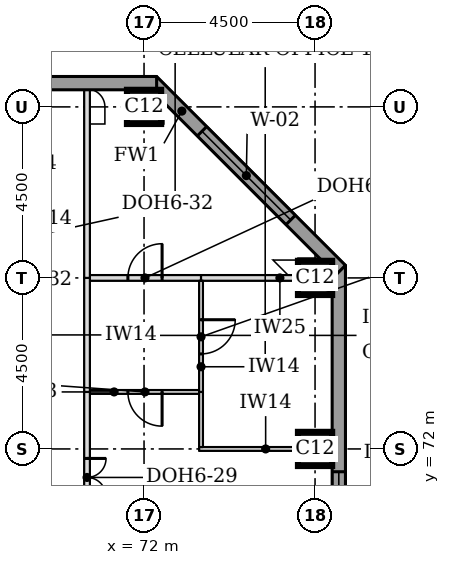
"""IFC4 building model, lengths in metres.
Left out: names, types, materials, properties, quantities, classifications, styles, units other than length and angle.
Written with IfcOpenShell. Run it as: python <this file> out.ifc"""

import sys

from ifc_helpers import new_model, si_unit, direction, frame, frame_2d, origin, origin_2d, place, context, subcontext, project, spatial, rectangle, extrude, element, fill, save


model = new_model("IFC4")
c1 = context("Model", 3, precision=1e-05, world=origin(), true_north=direction((0.0, 1.0)))
c2 = subcontext(c1, "Body", "Model", "MODEL_VIEW")
j1 = project(units=[si_unit("LENGTHUNIT", "METRE"), si_unit("PLANEANGLEUNIT", "RADIAN")], contexts=[c1])
p1 = place(None, origin())
s1 = spatial("IfcSite", under=j1, at=p1, CompositionType="ELEMENT")
p2 = place(p1, origin())
s2 = spatial("IfcBuilding", under=s1, at=p2, CompositionType="ELEMENT")
p3 = place(p2, frame((0.0, 0.0, 188.4)))
s3 = spatial("IfcBuildingStorey", under=s2, at=p3, CompositionType="ELEMENT", Elevation=188.4)
for number, where, z_axis, x_axis in (
    (1, (76.5, 72.0, 0.0), (0.0, 0.0, 1.0), (1.0, 0.0, 0.0)),
    (2, (76.5, 76.5, 0.0), (0.0, 0.0, 1.0), (1.0, 0.0, 0.0)),
    (3, (72.0, 81.0, 0.0), (0.0, 0.0, 1.0), (1.0, 0.0, 0.0)),
):
    element("IfcColumn", number, at=place(p3, frame(where, z_axis=z_axis, x_axis=x_axis)), inside=s3, PredefinedType="COLUMN", context=c2, shape_type="SweptSolid", body=[
        extrude(rectangle(XDim=0.9, YDim=0.9, at=origin_2d()), origin(), (0.0, 0.0, 1.0), 3.7),
    ])
p4 = place(p3, frame((77.125, 44.669, 0.0), z_axis=(0.0, 0.0, 1.0), x_axis=(0.0, 1.0, 0.0)))
e4 = element("IfcWall", 4, at=p4, inside=s3, PredefinedType="STANDARD", context=c2, shape_type="SweptSolid", body=[
    extrude(rectangle(XDim=32.163, YDim=0.35, at=frame_2d((16.081, 0.0))), origin(), (0.0, 0.0, 1.0), 3.525),
])
p5 = place(p4, frame((5.431, 0.0, 0.9)))
e5 = element("IfcOpeningElement", 5, at=p5, cuts=e4, PredefinedType="OPENING", context=c2, shape_type="SweptSolid", body=[
    extrude(rectangle(XDim=3.3, YDim=1.9, at=frame_2d((1.65, 0.95))), frame((0.0, 0.185, 0.0), z_axis=(0.0, -1.0, 0.0), x_axis=(1.0, 0.0, 0.0)), (0.0, 0.0, 1.0), 0.37),
])
p6 = place(p4, frame((9.931, 0.0, 0.9)))
e6 = element("IfcOpeningElement", 6, at=p6, cuts=e4, PredefinedType="OPENING", context=c2, shape_type="SweptSolid", body=[
    extrude(rectangle(XDim=3.3, YDim=1.9, at=frame_2d((1.65, 0.95))), frame((0.0, 0.185, 0.0), z_axis=(0.0, -1.0, 0.0), x_axis=(1.0, 0.0, 0.0)), (0.0, 0.0, 1.0), 0.37),
])
p7 = place(p4, frame((14.431, 0.0, 0.9)))
e7 = element("IfcOpeningElement", 7, at=p7, cuts=e4, PredefinedType="OPENING", context=c2, shape_type="SweptSolid", body=[
    extrude(rectangle(XDim=3.3, YDim=1.9, at=frame_2d((1.65, 0.95))), frame((0.0, 0.185, 0.0), z_axis=(0.0, -1.0, 0.0), x_axis=(1.0, 0.0, 0.0)), (0.0, 0.0, 1.0), 0.37),
])
p8 = place(p4, frame((18.931, 0.0, 0.9)))
e8 = element("IfcOpeningElement", 8, at=p8, cuts=e4, PredefinedType="OPENING", context=c2, shape_type="SweptSolid", body=[
    extrude(rectangle(XDim=3.3, YDim=1.9, at=frame_2d((1.65, 0.95))), frame((0.0, 0.185, 0.0), z_axis=(0.0, -1.0, 0.0), x_axis=(1.0, 0.0, 0.0)), (0.0, 0.0, 1.0), 0.37),
])
p9 = place(p4, frame((23.431, 0.0, 0.9)))
e9 = element("IfcOpeningElement", 9, at=p9, cuts=e4, PredefinedType="OPENING", context=c2, shape_type="SweptSolid", body=[
    extrude(rectangle(XDim=3.3, YDim=1.9, at=frame_2d((1.65, 0.95))), frame((0.0, 0.185, 0.0), z_axis=(0.0, -1.0, 0.0), x_axis=(1.0, 0.0, 0.0)), (0.0, 0.0, 1.0), 0.37),
])
p10 = place(p3, frame((77.176, 76.708, 0.0), z_axis=(0.0, 0.0, 1.0), x_axis=(-0.707106781187, 0.707106781187, 0.0)))
e10 = element("IfcWall", 10, at=p10, inside=s3, PredefinedType="STANDARD", context=c2, shape_type="SweptSolid", body=[
    extrude(rectangle(XDim=7.027, YDim=0.35, at=frame_2d((3.513, 0.0))), origin(), (0.0, 0.0, 1.0), 3.525),
])
p11 = place(p10, frame((1.863, 0.0, 0.9)))
e11 = element("IfcOpeningElement", 11, at=p11, cuts=e10, PredefinedType="OPENING", context=c2, shape_type="SweptSolid", body=[
    extrude(rectangle(XDim=3.3, YDim=1.9, at=frame_2d((1.65, 0.95))), frame((0.0, 0.185, 0.0), z_axis=(0.0, -1.0, 0.0), x_axis=(1.0, 0.0, 0.0)), (0.0, 0.0, 1.0), 0.37),
])
p12 = place(p3, frame((72.331, 81.625, 0.0), z_axis=(0.0, 0.0, 1.0), x_axis=(-1.0, 0.0, 0.0)))
e12 = element("IfcWall", 12, at=p12, inside=s3, PredefinedType="STANDARD", context=c2, shape_type="SweptSolid", body=[
    extrude(rectangle(XDim=32.163, YDim=0.35, at=frame_2d((16.081, 0.0))), origin(), (0.0, 0.0, 1.0), 3.525),
])
p13 = place(p12, frame((5.431, 0.0, 0.9)))
e13 = element("IfcOpeningElement", 13, at=p13, cuts=e12, PredefinedType="OPENING", context=c2, shape_type="SweptSolid", body=[
    extrude(rectangle(XDim=3.3, YDim=1.9, at=frame_2d((1.65, 0.95))), frame((0.0, 0.185, 0.0), z_axis=(0.0, -1.0, 0.0), x_axis=(1.0, 0.0, 0.0)), (0.0, 0.0, 1.0), 0.37),
])
p14 = place(p12, frame((9.931, 0.0, 0.9)))
e14 = element("IfcOpeningElement", 14, at=p14, cuts=e12, PredefinedType="OPENING", context=c2, shape_type="SweptSolid", body=[
    extrude(rectangle(XDim=3.3, YDim=1.9, at=frame_2d((1.65, 0.95))), frame((0.0, 0.185, 0.0), z_axis=(0.0, -1.0, 0.0), x_axis=(1.0, 0.0, 0.0)), (0.0, 0.0, 1.0), 0.37),
])
p15 = place(p12, frame((14.431, 0.0, 0.9)))
e15 = element("IfcOpeningElement", 15, at=p15, cuts=e12, PredefinedType="OPENING", context=c2, shape_type="SweptSolid", body=[
    extrude(rectangle(XDim=3.3, YDim=1.9, at=frame_2d((1.65, 0.95))), frame((0.0, 0.185, 0.0), z_axis=(0.0, -1.0, 0.0), x_axis=(1.0, 0.0, 0.0)), (0.0, 0.0, 1.0), 0.37),
])
p16 = place(p12, frame((18.931, 0.0, 0.9)))
e16 = element("IfcOpeningElement", 16, at=p16, cuts=e12, PredefinedType="OPENING", context=c2, shape_type="SweptSolid", body=[
    extrude(rectangle(XDim=3.3, YDim=1.9, at=frame_2d((1.65, 0.95))), frame((0.0, 0.185, 0.0), z_axis=(0.0, -1.0, 0.0), x_axis=(1.0, 0.0, 0.0)), (0.0, 0.0, 1.0), 0.37),
])
p17 = place(p12, frame((23.431, 0.0, 0.9)))
e17 = element("IfcOpeningElement", 17, at=p17, cuts=e12, PredefinedType="OPENING", context=c2, shape_type="SweptSolid", body=[
    extrude(rectangle(XDim=3.3, YDim=1.9, at=frame_2d((1.65, 0.95))), frame((0.0, 0.185, 0.0), z_axis=(0.0, -1.0, 0.0), x_axis=(1.0, 0.0, 0.0)), (0.0, 0.0, 1.0), 0.37),
])
p18 = place(p3, frame((73.45, 72.0, 0.0), z_axis=(0.0, 0.0, 1.0), x_axis=(1.0, 0.0, 0.0)))
e18 = element("IfcWall", 18, at=p18, inside=s3, PredefinedType="PARTITIONING", context=c2, shape_type="SweptSolid", body=[
    extrude(rectangle(XDim=3.5, YDim=0.1, at=frame_2d((1.75, 0.0))), origin(), (0.0, 0.0, 1.0), 3.55),
])
p19 = place(p3, frame((70.575, 73.5, 0.0), z_axis=(0.0, 0.0, 1.0), x_axis=(1.0, 0.0, 0.0)))
e19 = element("IfcWall", 19, at=p19, inside=s3, PredefinedType="PARTITIONING", context=c2, shape_type="SweptSolid", body=[
    extrude(rectangle(XDim=2.875, YDim=0.1, at=frame_2d((1.438, 0.0))), origin(), (0.0, 0.0, 1.0), 3.096),
])
p20 = place(p19, frame((1.0, 0.0, 0.0)))
e20 = element("IfcOpeningElement", 20, at=p20, cuts=e19, PredefinedType="OPENING", context=c2, shape_type="SweptSolid", body=[
    extrude(rectangle(XDim=0.9, YDim=2.1, at=frame_2d((0.45, 1.05))), frame((0.0, 0.06, 0.0), z_axis=(0.0, -1.0, 0.0), x_axis=(1.0, 0.0, 0.0)), (0.0, 0.0, 1.0), 0.12),
])
p21 = place(p3, frame((70.575, 76.5, 0.0), z_axis=(0.0, 0.0, 1.0), x_axis=(1.0, 0.0, 0.0)))
e21 = element("IfcWall", 21, at=p21, inside=s3, PredefinedType="PARTITIONING", context=c2, shape_type="SweptSolid", body=[
    extrude(rectangle(XDim=2.925, YDim=0.15, at=frame_2d((1.462, 0.0))), origin(), (0.0, 0.0, 1.0), 3.096),
])
p22 = place(p21, frame((1.0, 0.0, 0.0)))
e22 = element("IfcOpeningElement", 22, at=p22, cuts=e21, PredefinedType="OPENING", context=c2, shape_type="SweptSolid", body=[
    extrude(rectangle(XDim=0.9, YDim=2.1, at=frame_2d((0.45, 1.05))), frame((0.0, 0.085, 0.0), z_axis=(0.0, -1.0, 0.0), x_axis=(1.0, 0.0, 0.0)), (0.0, 0.0, 1.0), 0.17),
])
p23 = place(p3, frame((73.5, 76.5, 0.0), z_axis=(0.0, 0.0, 1.0), x_axis=(1.0, 0.0, 0.0)))
e23 = element("IfcWall", 23, at=p23, inside=s3, PredefinedType="PARTITIONING", context=c2, shape_type="SweptSolid", body=[
    extrude(rectangle(XDim=2.55, YDim=0.15, at=frame_2d((1.275, 0.0))), origin(), (0.0, 0.0, 1.0), 3.096),
])
p24 = place(p3, frame((70.5, 69.0, 0.0), z_axis=(0.0, 0.0, 1.0), x_axis=(0.0, 1.0, 0.0)))
e24 = element("IfcWall", 24, at=p24, inside=s3, PredefinedType="PARTITIONING", context=c2, shape_type="SweptSolid", body=[
    extrude(rectangle(XDim=4.5, YDim=0.15, at=frame_2d((2.25, 0.0))), origin(), (0.0, 0.0, 1.0), 3.55),
])
p25 = place(p24, frame((1.75, 0.0, 0.0)))
e25 = element("IfcOpeningElement", 25, at=p25, cuts=e24, PredefinedType="OPENING", context=c2, shape_type="SweptSolid", body=[
    extrude(rectangle(XDim=1.0, YDim=2.1, at=frame_2d((0.5, 1.05))), frame((0.0, 0.085, 0.0), z_axis=(0.0, -1.0, 0.0), x_axis=(1.0, 0.0, 0.0)), (0.0, 0.0, 1.0), 0.17),
])
p26 = place(p3, frame((73.5, 72.05, 0.0), z_axis=(0.0, 0.0, 1.0), x_axis=(0.0, 1.0, 0.0)))
e26 = element("IfcWall", 26, at=p26, inside=s3, PredefinedType="PARTITIONING", context=c2, shape_type="SweptSolid", body=[
    extrude(rectangle(XDim=1.45, YDim=0.1, at=frame_2d((0.725, 0.0))), origin(), (0.0, 0.0, 1.0), 3.55),
])
p27 = place(p3, frame((70.5, 73.5, 0.0), z_axis=(0.0, 0.0, 1.0), x_axis=(0.0, 1.0, 0.0)))
e27 = element("IfcWall", 27, at=p27, inside=s3, PredefinedType="PARTITIONING", context=c2, shape_type="SweptSolid", body=[
    extrude(rectangle(XDim=3.0, YDim=0.15, at=frame_2d((1.5, 0.0))), origin(), (0.0, 0.0, 1.0), 3.55),
])
p28 = place(p3, frame((73.5, 73.5, 0.0), z_axis=(0.0, 0.0, 1.0), x_axis=(0.0, 1.0, 0.0)))
e28 = element("IfcWall", 28, at=p28, inside=s3, PredefinedType="PARTITIONING", context=c2, shape_type="SweptSolid", body=[
    extrude(rectangle(XDim=2.925, YDim=0.1, at=frame_2d((1.462, 0.0))), origin(), (0.0, 0.0, 1.0), 3.55),
])
p29 = place(p28, frame((1.0, 0.0, 0.0)))
e29 = element("IfcOpeningElement", 29, at=p29, cuts=e28, PredefinedType="OPENING", context=c2, shape_type="SweptSolid", body=[
    extrude(rectangle(XDim=0.9, YDim=2.1, at=frame_2d((0.45, 1.05))), frame((0.0, 0.06, 0.0), z_axis=(0.0, -1.0, 0.0), x_axis=(1.0, 0.0, 0.0)), (0.0, 0.0, 1.0), 0.12),
])
p30 = place(p3, frame((70.5, 76.5, 0.0), z_axis=(0.0, 0.0, 1.0), x_axis=(0.0, 1.0, 0.0)))
e30 = element("IfcWall", 30, at=p30, inside=s3, PredefinedType="PARTITIONING", context=c2, shape_type="SweptSolid", body=[
    extrude(rectangle(XDim=4.95, YDim=0.15, at=frame_2d((2.475, 0.0))), origin(), (0.0, 0.0, 1.0), 3.55),
])
p31 = place(p9, origin())
e31 = element("IfcWindow", 31, at=p31, inside=s3, PartitioningType="SINGLE_PANEL", PredefinedType="WINDOW", context=c2, shape_type="SweptSolid", body=[
    extrude(rectangle(XDim=3.3, YDim=1.9, at=frame_2d((1.65, 0.95))), frame((0.0, 0.085, 0.0), z_axis=(0.0, -1.0, 0.0), x_axis=(1.0, 0.0, 0.0)), (0.0, 0.0, 1.0), 0.06),
])
fill(e9, e31)
p32 = place(p11, origin())
e32 = element("IfcWindow", 32, at=p32, inside=s3, PartitioningType="SINGLE_PANEL", PredefinedType="WINDOW", context=c2, shape_type="SweptSolid", body=[
    extrude(rectangle(XDim=3.3, YDim=1.9, at=frame_2d((1.65, 0.95))), frame((0.0, 0.085, 0.0), z_axis=(0.0, -1.0, 0.0), x_axis=(1.0, 0.0, 0.0)), (0.0, 0.0, 1.0), 0.06),
])
fill(e11, e32)
p33 = place(p25, frame((1.0, 0.0, 0.0), z_axis=(0.0, 0.0, 1.0), x_axis=(-1.0, 0.0, 0.0)))
e33 = element("IfcDoor", 33, at=p33, inside=s3, OperationType="DOUBLE_DOOR_SINGLE_SWING", PredefinedType="DOOR", context=c2, shape_type="SweptSolid", body=[
    extrude(rectangle(XDim=1.0, YDim=2.1, at=frame_2d((0.5, 1.05))), frame((0.0, 0.025, 0.0), z_axis=(0.0, -1.0, 0.0), x_axis=(1.0, 0.0, 0.0)), (0.0, 0.0, 1.0), 0.05),
])
fill(e25, e33)
p34 = place(p20, frame((0.9, 0.0, 0.0), z_axis=(0.0, 0.0, 1.0), x_axis=(-1.0, 0.0, 0.0)))
e34 = element("IfcDoor", 34, at=p34, inside=s3, OperationType="SINGLE_SWING_LEFT", PredefinedType="DOOR", context=c2, shape_type="SweptSolid", body=[
    extrude(rectangle(XDim=0.9, YDim=2.1, at=frame_2d((0.45, 1.05))), frame((0.0, 0.025, 0.0), z_axis=(0.0, -1.0, 0.0), x_axis=(1.0, 0.0, 0.0)), (0.0, 0.0, 1.0), 0.05),
])
fill(e20, e34)
p35 = place(p29, frame((0.9, 0.0, 0.0), z_axis=(0.0, 0.0, 1.0), x_axis=(-1.0, 0.0, 0.0)))
e35 = element("IfcDoor", 35, at=p35, inside=s3, OperationType="SINGLE_SWING_LEFT", PredefinedType="DOOR", context=c2, shape_type="SweptSolid", body=[
    extrude(rectangle(XDim=0.9, YDim=2.1, at=frame_2d((0.45, 1.05))), frame((0.0, 0.025, 0.0), z_axis=(0.0, -1.0, 0.0), x_axis=(1.0, 0.0, 0.0)), (0.0, 0.0, 1.0), 0.05),
])
fill(e29, e35)
p36 = place(p22, origin())
e36 = element("IfcDoor", 36, at=p36, inside=s3, OperationType="SINGLE_SWING_RIGHT", PredefinedType="DOOR", context=c2, shape_type="SweptSolid", body=[
    extrude(rectangle(XDim=0.9, YDim=2.1, at=frame_2d((0.45, 1.05))), frame((0.0, 0.025, 0.0), z_axis=(0.0, -1.0, 0.0), x_axis=(1.0, 0.0, 0.0)), (0.0, 0.0, 1.0), 0.05),
])
fill(e22, e36)
save(model, sys.argv[1])
